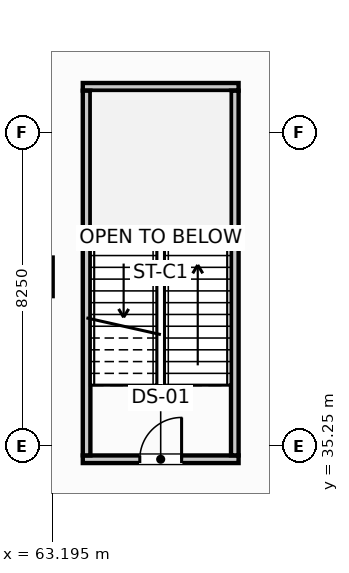
"""IFC4 building model, lengths in metres.
Left out: names, types, materials, properties, quantities, classifications, styles, units other than length and angle.
Written with IfcOpenShell. Run it as: python <this file> out.ifc"""

import sys

from ifc_helpers import new_model, si_unit, direction, frame, frame_2d, origin, origin_2d, place, context, subcontext, project, spatial, rectangle, extrude, element, fill, save


model = new_model("IFC4")
c1 = context("Model", 3, precision=1e-05, world=origin(), true_north=direction((0.0, 1.0)))
c2 = subcontext(c1, "Body", "Model", "MODEL_VIEW")
j1 = project(units=[si_unit("LENGTHUNIT", "METRE"), si_unit("PLANEANGLEUNIT", "RADIAN")], contexts=[c1])
p1 = place(None, origin())
s1 = spatial("IfcSite", under=j1, at=p1, CompositionType="ELEMENT")
p2 = place(p1, origin())
s2 = spatial("IfcBuilding", under=s1, at=p2, CompositionType="ELEMENT")
p3 = place(p2, frame((0.0, 0.0, -9.0)))
s3 = spatial("IfcBuildingStorey", under=s2, at=p3, CompositionType="ELEMENT", Elevation=-9.0)
p4 = place(p3, frame((62.7, 39.7, -0.32), z_axis=(0.0, 0.0, 1.0), x_axis=(1.0, 0.0, 0.0)))
e1 = element("IfcColumn", 1, at=p4, inside=s3, PredefinedType="COLUMN", context=c2, shape_type="SweptSolid", body=[
    extrude(rectangle(XDim=1.05, YDim=1.05, at=origin_2d()), origin(), (0.0, 0.0, 1.0), 4.5),
])
p5 = place(p3, frame((64.0, 34.9, -0.32), z_axis=(0.0, 0.0, 1.0), x_axis=(1.0, 0.0, 0.0)))
e2 = element("IfcWall", 2, at=p5, inside=s3, PredefinedType="SHEAR", context=c2, shape_type="SweptSolid", body=[
    extrude(rectangle(XDim=4.1, YDim=0.2, at=frame_2d((2.05, 0.0))), origin(), (0.0, 0.0, 1.0), 4.5),
])
p6 = place(p5, frame((1.5, 0.0, 0.32)))
e3 = element("IfcOpeningElement", 3, at=p6, cuts=e2, PredefinedType="OPENING", context=c2, shape_type="SweptSolid", body=[
    extrude(rectangle(XDim=1.1, YDim=2.15, at=frame_2d((0.55, 1.075))), frame((0.0, 0.11, 0.0), z_axis=(0.0, -1.0, 0.0), x_axis=(1.0, 0.0, 0.0)), (0.0, 0.0, 1.0), 0.22),
])
p7 = place(p3, frame((64.0, 44.7, -0.32), z_axis=(0.0, 0.0, 1.0), x_axis=(1.0, 0.0, 0.0)))
e4 = element("IfcWall", 4, at=p7, inside=s3, PredefinedType="SHEAR", context=c2, shape_type="SweptSolid", body=[
    extrude(rectangle(XDim=4.1, YDim=0.2, at=frame_2d((2.05, 0.0))), origin(), (0.0, 0.0, 1.0), 4.5),
])
for number, where, z_axis, x_axis in (
    (5, (64.1, 35.002, -0.32), (0.0, 0.0, 1.0), (0.0, 1.0, 0.0)),
    (6, (68.0, 35.002, -0.32), (0.0, 0.0, 1.0), (0.0, 1.0, 0.0)),
):
    element("IfcWall", number, at=place(p3, frame(where, z_axis=z_axis, x_axis=x_axis)), inside=s3, PredefinedType="SHEAR", context=c2, shape_type="SweptSolid", body=[
        extrude(rectangle(XDim=9.596, YDim=0.2, at=frame_2d((4.798, 0.0))), origin(), (0.0, 0.0, 1.0), 4.5),
    ])
p8 = place(p6, origin())
e7 = element("IfcDoor", 7, at=p8, inside=s3, OperationType="SINGLE_SWING_RIGHT", PredefinedType="DOOR", context=c2, shape_type="SweptSolid", body=[
    extrude(rectangle(XDim=1.1, YDim=2.15, at=frame_2d((0.55, 1.075))), frame((0.0, 0.025, 0.0), z_axis=(0.0, -1.0, 0.0), x_axis=(1.0, 0.0, 0.0)), (0.0, 0.0, 1.0), 0.05),
])
fill(e3, e7)
save(model, sys.argv[1])
